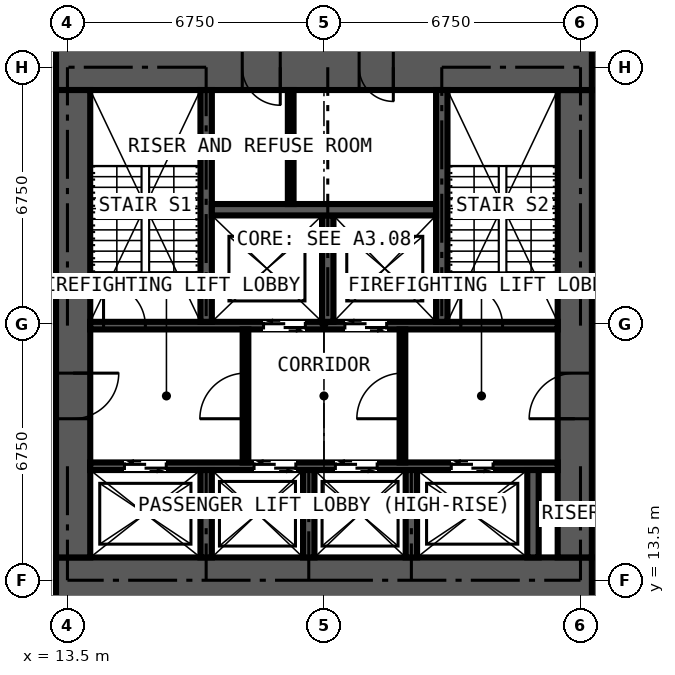
"""IFC4 building model, lengths in metres.
Left out: names, types, materials, properties, quantities, classifications, styles, units other than length and angle.
Written with IfcOpenShell. Run it as: python <this file> out.ifc"""

import sys

from ifc_helpers import new_model, si_unit, direction, frame, frame_2d, origin, place, context, subcontext, project, spatial, rectangle, extrude, element, fill, save


model = new_model("IFC4")
c1 = context("Model", 3, precision=1e-05, world=origin(), true_north=direction((0.0, 1.0)))
c2 = subcontext(c1, "Body", "Model", "MODEL_VIEW")
j1 = project(units=[si_unit("LENGTHUNIT", "METRE"), si_unit("PLANEANGLEUNIT", "RADIAN")], contexts=[c1])
p1 = place(None, origin())
s1 = spatial("IfcSite", under=j1, at=p1, CompositionType="ELEMENT")
p2 = place(p1, origin())
s2 = spatial("IfcBuilding", under=s1, at=p2, CompositionType="ELEMENT")
p3 = place(p2, frame((0.0, 0.0, 218.7)))
s3 = spatial("IfcBuildingStorey", under=s2, at=p3, CompositionType="ELEMENT", Elevation=218.7)
p4 = place(p3, frame((13.2, 13.5, 0.0), z_axis=(0.0, 0.0, 1.0), x_axis=(1.0, 0.0, 0.0)))
e1 = element("IfcWall", 1, at=p4, inside=s3, PredefinedType="SHEAR", context=c2, shape_type="SweptSolid", body=[
    extrude(rectangle(XDim=14.1, YDim=1.2, at=frame_2d((7.05, 0.0))), origin(), (0.0, 0.0, 1.0), 3.6),
])
p5 = place(p3, frame((26.85, 14.1, 0.0), z_axis=(0.0, 0.0, 1.0), x_axis=(0.0, 1.0, 0.0)))
e2 = element("IfcWall", 2, at=p5, inside=s3, PredefinedType="SHEAR", context=c2, shape_type="SweptSolid", body=[
    extrude(rectangle(XDim=12.3, YDim=0.9, at=frame_2d((6.15, 0.0))), origin(), (0.0, 0.0, 1.0), 3.6),
])
p6 = place(p5, frame((3.65, 0.0, 0.0)))
e3 = element("IfcOpeningElement", 3, at=p6, cuts=e2, PredefinedType="OPENING", context=c2, shape_type="SweptSolid", body=[
    extrude(rectangle(XDim=1.2, YDim=2.2, at=frame_2d((0.6, 1.1))), frame((0.0, 0.46, 0.0), z_axis=(0.0, -1.0, 0.0), x_axis=(1.0, 0.0, 0.0)), (0.0, 0.0, 1.0), 0.92),
])
p7 = place(p3, frame((27.3, 27.0, 0.0), z_axis=(0.0, 0.0, 1.0), x_axis=(-1.0, 0.0, 0.0)))
e4 = element("IfcWall", 4, at=p7, inside=s3, PredefinedType="SHEAR", context=c2, shape_type="SweptSolid", body=[
    extrude(rectangle(XDim=14.1, YDim=1.2, at=frame_2d((7.05, 0.0))), origin(), (0.0, 0.0, 1.0), 3.6),
])
p8 = place(p7, frame((5.225, 0.0, 0.0)))
e5 = element("IfcOpeningElement", 5, at=p8, cuts=e4, PredefinedType="OPENING", context=c2, shape_type="SweptSolid", body=[
    extrude(rectangle(XDim=0.9, YDim=2.2, at=frame_2d((0.45, 1.1))), frame((0.0, 0.61, 0.0), z_axis=(0.0, -1.0, 0.0), x_axis=(1.0, 0.0, 0.0)), (0.0, 0.0, 1.0), 1.22),
])
p9 = place(p7, frame((8.2, 0.0, 0.0)))
e6 = element("IfcOpeningElement", 6, at=p9, cuts=e4, PredefinedType="OPENING", context=c2, shape_type="SweptSolid", body=[
    extrude(rectangle(XDim=1.0, YDim=2.2, at=frame_2d((0.5, 1.1))), frame((0.0, 0.61, 0.0), z_axis=(0.0, -1.0, 0.0), x_axis=(1.0, 0.0, 0.0)), (0.0, 0.0, 1.0), 1.22),
])
p10 = place(p3, frame((13.65, 26.4, 0.0), z_axis=(0.0, 0.0, 1.0), x_axis=(0.0, -1.0, 0.0)))
e7 = element("IfcWall", 7, at=p10, inside=s3, PredefinedType="SHEAR", context=c2, shape_type="SweptSolid", body=[
    extrude(rectangle(XDim=12.3, YDim=0.9, at=frame_2d((6.15, 0.0))), origin(), (0.0, 0.0, 1.0), 3.6),
])
p11 = place(p10, frame((7.45, 0.0, 0.0)))
e8 = element("IfcOpeningElement", 8, at=p11, cuts=e7, PredefinedType="OPENING", context=c2, shape_type="SweptSolid", body=[
    extrude(rectangle(XDim=1.2, YDim=2.2, at=frame_2d((0.6, 1.1))), frame((0.0, 0.46, 0.0), z_axis=(0.0, -1.0, 0.0), x_axis=(1.0, 0.0, 0.0)), (0.0, 0.0, 1.0), 0.92),
])
p12 = place(p3, frame((14.1, 16.5, 0.0), z_axis=(0.0, 0.0, 1.0), x_axis=(1.0, 0.0, 0.0)))
e9 = element("IfcWall", 9, at=p12, inside=s3, PredefinedType="SHEAR", context=c2, shape_type="SweptSolid", body=[
    extrude(rectangle(XDim=12.3, YDim=0.2, at=frame_2d((6.15, 0.0))), origin(), (0.0, 0.0, 1.0), 3.6),
])
p13 = place(p12, frame((0.9, 0.0, 0.0)))
e10 = element("IfcOpeningElement", 10, at=p13, cuts=e9, PredefinedType="OPENING", context=c2, shape_type="SweptSolid", body=[
    extrude(rectangle(XDim=1.1, YDim=2.2, at=frame_2d((0.55, 1.1))), frame((0.0, 0.11, 0.0), z_axis=(0.0, -1.0, 0.0), x_axis=(1.0, 0.0, 0.0)), (0.0, 0.0, 1.0), 0.22),
])
p14 = place(p12, frame((4.31, 0.0, 0.0)))
e11 = element("IfcOpeningElement", 11, at=p14, cuts=e9, PredefinedType="OPENING", context=c2, shape_type="SweptSolid", body=[
    extrude(rectangle(XDim=1.1, YDim=2.2, at=frame_2d((0.55, 1.1))), frame((0.0, 0.11, 0.0), z_axis=(0.0, -1.0, 0.0), x_axis=(1.0, 0.0, 0.0)), (0.0, 0.0, 1.0), 0.22),
])
p15 = place(p12, frame((6.45, 0.0, 0.0)))
e12 = element("IfcOpeningElement", 12, at=p15, cuts=e9, PredefinedType="OPENING", context=c2, shape_type="SweptSolid", body=[
    extrude(rectangle(XDim=1.1, YDim=2.2, at=frame_2d((0.55, 1.1))), frame((0.0, 0.11, 0.0), z_axis=(0.0, -1.0, 0.0), x_axis=(1.0, 0.0, 0.0)), (0.0, 0.0, 1.0), 0.22),
])
p16 = place(p12, frame((9.5, 0.0, 0.0)))
e13 = element("IfcOpeningElement", 13, at=p16, cuts=e9, PredefinedType="OPENING", context=c2, shape_type="SweptSolid", body=[
    extrude(rectangle(XDim=1.1, YDim=2.2, at=frame_2d((0.55, 1.1))), frame((0.0, 0.11, 0.0), z_axis=(0.0, -1.0, 0.0), x_axis=(1.0, 0.0, 0.0)), (0.0, 0.0, 1.0), 0.22),
])
p17 = place(p3, frame((14.1, 20.2, 0.0), z_axis=(0.0, 0.0, 1.0), x_axis=(1.0, 0.0, 0.0)))
e14 = element("IfcWall", 14, at=p17, inside=s3, PredefinedType="SHEAR", context=c2, shape_type="SweptSolid", body=[
    extrude(rectangle(XDim=12.3, YDim=0.2, at=frame_2d((6.15, 0.0))), origin(), (0.0, 0.0, 1.0), 3.6),
])
p18 = place(p17, frame((4.56, 0.0, 0.0)))
e15 = element("IfcOpeningElement", 15, at=p18, cuts=e14, PredefinedType="OPENING", context=c2, shape_type="SweptSolid", body=[
    extrude(rectangle(XDim=1.1, YDim=2.2, at=frame_2d((0.55, 1.1))), frame((0.0, 0.11, 0.0), z_axis=(0.0, -1.0, 0.0), x_axis=(1.0, 0.0, 0.0)), (0.0, 0.0, 1.0), 0.22),
])
p19 = place(p17, frame((6.7, 0.0, 0.0)))
e16 = element("IfcOpeningElement", 16, at=p19, cuts=e14, PredefinedType="OPENING", context=c2, shape_type="SweptSolid", body=[
    extrude(rectangle(XDim=1.1, YDim=2.2, at=frame_2d((0.55, 1.1))), frame((0.0, 0.11, 0.0), z_axis=(0.0, -1.0, 0.0), x_axis=(1.0, 0.0, 0.0)), (0.0, 0.0, 1.0), 0.22),
])
p20 = place(p17, frame((0.35, 0.0, 0.0)))
e17 = element("IfcOpeningElement", 17, at=p20, cuts=e14, PredefinedType="OPENING", context=c2, shape_type="SweptSolid", body=[
    extrude(rectangle(XDim=1.1, YDim=2.2, at=frame_2d((0.55, 1.1))), frame((0.0, 0.11, 0.0), z_axis=(0.0, -1.0, 0.0), x_axis=(1.0, 0.0, 0.0)), (0.0, 0.0, 1.0), 0.22),
])
p21 = place(p17, frame((9.75, 0.0, 0.0)))
e18 = element("IfcOpeningElement", 18, at=p21, cuts=e14, PredefinedType="OPENING", context=c2, shape_type="SweptSolid", body=[
    extrude(rectangle(XDim=1.1, YDim=2.2, at=frame_2d((0.55, 1.1))), frame((0.0, 0.11, 0.0), z_axis=(0.0, -1.0, 0.0), x_axis=(1.0, 0.0, 0.0)), (0.0, 0.0, 1.0), 0.22),
])
for number, where, z_axis, x_axis in (
    (19, (17.15, 20.3, 0.0), (0.0, 0.0, 1.0), (0.0, 1.0, 0.0)),
    (20, (23.35, 20.3, 0.0), (0.0, 0.0, 1.0), (0.0, 1.0, 0.0)),
):
    element("IfcWall", number, at=place(p3, frame(where, z_axis=z_axis, x_axis=x_axis)), inside=s3, PredefinedType="SHEAR", context=c2, shape_type="SweptSolid", body=[
        extrude(rectangle(XDim=6.1, YDim=0.3, at=frame_2d((3.05, 0.0))), origin(), (0.0, 0.0, 1.0), 3.6),
    ])
p22 = place(p3, frame((20.35, 20.3, 0.0), z_axis=(0.0, 0.0, 1.0), x_axis=(0.0, 1.0, 0.0)))
e21 = element("IfcWall", 21, at=p22, inside=s3, PredefinedType="SHEAR", context=c2, shape_type="SweptSolid", body=[
    extrude(rectangle(XDim=2.8, YDim=0.3, at=frame_2d((1.4, 0.0))), origin(), (0.0, 0.0, 1.0), 3.6),
])
p23 = place(p3, frame((17.3, 23.25, 0.0), z_axis=(0.0, 0.0, 1.0), x_axis=(1.0, 0.0, 0.0)))
e22 = element("IfcWall", 22, at=p23, inside=s3, PredefinedType="SHEAR", context=c2, shape_type="SweptSolid", body=[
    extrude(rectangle(XDim=5.9, YDim=0.3, at=frame_2d((2.95, 0.0))), origin(), (0.0, 0.0, 1.0), 3.6),
])
for number, where, z_axis, x_axis in (
    (23, (17.15, 14.1, 0.0), (0.0, 0.0, 1.0), (0.0, 1.0, 0.0)),
    (24, (19.85, 14.1, 0.0), (0.0, 0.0, 1.0), (0.0, 1.0, 0.0)),
    (25, (22.55, 14.1, 0.0), (0.0, 0.0, 1.0), (0.0, 1.0, 0.0)),
    (26, (25.75, 14.1, 0.0), (0.0, 0.0, 1.0), (0.0, 1.0, 0.0)),
):
    element("IfcWall", number, at=place(p3, frame(where, z_axis=z_axis, x_axis=x_axis)), inside=s3, PredefinedType="SHEAR", context=c2, shape_type="SweptSolid", body=[
        extrude(rectangle(XDim=2.3, YDim=0.3, at=frame_2d((1.15, 0.0))), origin(), (0.0, 0.0, 1.0), 3.6),
    ])
p24 = place(p3, frame((18.185, 16.6, 0.0), z_axis=(0.0, 0.0, 1.0), x_axis=(0.0, 1.0, 0.0)))
e27 = element("IfcWall", 27, at=p24, inside=s3, PredefinedType="PARTITIONING", context=c2, shape_type="SweptSolid", body=[
    extrude(rectangle(XDim=3.5, YDim=0.15, at=frame_2d((1.75, 0.0))), origin(), (0.0, 0.0, 1.0), 3.375),
])
p25 = place(p24, frame((1.15, 0.0, 0.0)))
e28 = element("IfcOpeningElement", 28, at=p25, cuts=e27, PredefinedType="OPENING", context=c2, shape_type="SweptSolid", body=[
    extrude(rectangle(XDim=1.2, YDim=2.2, at=frame_2d((0.6, 1.1))), frame((0.0, 0.085, 0.0), z_axis=(0.0, -1.0, 0.0), x_axis=(1.0, 0.0, 0.0)), (0.0, 0.0, 1.0), 0.17),
])
p26 = place(p3, frame((22.315, 16.6, 0.0), z_axis=(0.0, 0.0, 1.0), x_axis=(0.0, 1.0, 0.0)))
e29 = element("IfcWall", 29, at=p26, inside=s3, PredefinedType="PARTITIONING", context=c2, shape_type="SweptSolid", body=[
    extrude(rectangle(XDim=3.5, YDim=0.15, at=frame_2d((1.75, 0.0))), origin(), (0.0, 0.0, 1.0), 3.375),
])
p27 = place(p26, frame((1.15, 0.0, 0.0)))
e30 = element("IfcOpeningElement", 30, at=p27, cuts=e29, PredefinedType="OPENING", context=c2, shape_type="SweptSolid", body=[
    extrude(rectangle(XDim=1.2, YDim=2.2, at=frame_2d((0.6, 1.1))), frame((0.0, 0.085, 0.0), z_axis=(0.0, -1.0, 0.0), x_axis=(1.0, 0.0, 0.0)), (0.0, 0.0, 1.0), 0.17),
])
p28 = place(p3, frame((19.375, 23.4, 0.0), z_axis=(0.0, 0.0, 1.0), x_axis=(0.0, 1.0, 0.0)))
e31 = element("IfcWall", 31, at=p28, inside=s3, PredefinedType="PARTITIONING", context=c2, shape_type="SweptSolid", body=[
    extrude(rectangle(XDim=3.0, YDim=0.15, at=frame_2d((1.5, 0.0))), origin(), (0.0, 0.0, 1.0), 3.375),
])
p29 = place(p13, origin())
e32 = element("IfcDoor", 32, at=p29, inside=s3, OperationType="DOUBLE_DOOR_SLIDING", PredefinedType="DOOR", context=c2, shape_type="SweptSolid", body=[
    extrude(rectangle(XDim=1.1, YDim=2.2, at=frame_2d((0.55, 1.1))), frame((0.0, 0.025, 0.0), z_axis=(0.0, -1.0, 0.0), x_axis=(1.0, 0.0, 0.0)), (0.0, 0.0, 1.0), 0.05),
])
fill(e10, e32)
p30 = place(p14, origin())
e33 = element("IfcDoor", 33, at=p30, inside=s3, OperationType="DOUBLE_DOOR_SLIDING", PredefinedType="DOOR", context=c2, shape_type="SweptSolid", body=[
    extrude(rectangle(XDim=1.1, YDim=2.2, at=frame_2d((0.55, 1.1))), frame((0.0, 0.025, 0.0), z_axis=(0.0, -1.0, 0.0), x_axis=(1.0, 0.0, 0.0)), (0.0, 0.0, 1.0), 0.05),
])
fill(e11, e33)
p31 = place(p15, origin())
e34 = element("IfcDoor", 34, at=p31, inside=s3, OperationType="DOUBLE_DOOR_SLIDING", PredefinedType="DOOR", context=c2, shape_type="SweptSolid", body=[
    extrude(rectangle(XDim=1.1, YDim=2.2, at=frame_2d((0.55, 1.1))), frame((0.0, 0.025, 0.0), z_axis=(0.0, -1.0, 0.0), x_axis=(1.0, 0.0, 0.0)), (0.0, 0.0, 1.0), 0.05),
])
fill(e12, e34)
p32 = place(p16, origin())
e35 = element("IfcDoor", 35, at=p32, inside=s3, OperationType="DOUBLE_DOOR_SLIDING", PredefinedType="DOOR", context=c2, shape_type="SweptSolid", body=[
    extrude(rectangle(XDim=1.1, YDim=2.2, at=frame_2d((0.55, 1.1))), frame((0.0, 0.025, 0.0), z_axis=(0.0, -1.0, 0.0), x_axis=(1.0, 0.0, 0.0)), (0.0, 0.0, 1.0), 0.05),
])
fill(e13, e35)
p33 = place(p18, origin())
e36 = element("IfcDoor", 36, at=p33, inside=s3, OperationType="DOUBLE_DOOR_SLIDING", PredefinedType="DOOR", context=c2, shape_type="SweptSolid", body=[
    extrude(rectangle(XDim=1.1, YDim=2.2, at=frame_2d((0.55, 1.1))), frame((0.0, 0.025, 0.0), z_axis=(0.0, -1.0, 0.0), x_axis=(1.0, 0.0, 0.0)), (0.0, 0.0, 1.0), 0.05),
])
fill(e15, e36)
p34 = place(p19, origin())
e37 = element("IfcDoor", 37, at=p34, inside=s3, OperationType="DOUBLE_DOOR_SLIDING", PredefinedType="DOOR", context=c2, shape_type="SweptSolid", body=[
    extrude(rectangle(XDim=1.1, YDim=2.2, at=frame_2d((0.55, 1.1))), frame((0.0, 0.025, 0.0), z_axis=(0.0, -1.0, 0.0), x_axis=(1.0, 0.0, 0.0)), (0.0, 0.0, 1.0), 0.05),
])
fill(e16, e37)
p35 = place(p11, origin())
e38 = element("IfcDoor", 38, at=p35, inside=s3, OperationType="DOUBLE_DOOR_SINGLE_SWING", PredefinedType="DOOR", context=c2, shape_type="SweptSolid", body=[
    extrude(rectangle(XDim=1.2, YDim=2.2, at=frame_2d((0.6, 1.1))), frame((0.0, 0.025, 0.0), z_axis=(0.0, -1.0, 0.0), x_axis=(1.0, 0.0, 0.0)), (0.0, 0.0, 1.0), 0.05),
])
fill(e8, e38)
p36 = place(p6, origin())
e39 = element("IfcDoor", 39, at=p36, inside=s3, OperationType="DOUBLE_DOOR_SINGLE_SWING", PredefinedType="DOOR", context=c2, shape_type="SweptSolid", body=[
    extrude(rectangle(XDim=1.2, YDim=2.2, at=frame_2d((0.6, 1.1))), frame((0.0, 0.025, 0.0), z_axis=(0.0, -1.0, 0.0), x_axis=(1.0, 0.0, 0.0)), (0.0, 0.0, 1.0), 0.05),
])
fill(e3, e39)
p37 = place(p25, origin())
e40 = element("IfcDoor", 40, at=p37, inside=s3, OperationType="DOUBLE_DOOR_SINGLE_SWING", PredefinedType="DOOR", context=c2, shape_type="SweptSolid", body=[
    extrude(rectangle(XDim=1.2, YDim=2.2, at=frame_2d((0.6, 1.1))), frame((0.0, 0.025, 0.0), z_axis=(0.0, -1.0, 0.0), x_axis=(1.0, 0.0, 0.0)), (0.0, 0.0, 1.0), 0.05),
])
fill(e28, e40)
p38 = place(p27, origin())
e41 = element("IfcDoor", 41, at=p38, inside=s3, OperationType="DOUBLE_DOOR_SINGLE_SWING", PredefinedType="DOOR", context=c2, shape_type="SweptSolid", body=[
    extrude(rectangle(XDim=1.2, YDim=2.2, at=frame_2d((0.6, 1.1))), frame((0.0, 0.025, 0.0), z_axis=(0.0, -1.0, 0.0), x_axis=(1.0, 0.0, 0.0)), (0.0, 0.0, 1.0), 0.05),
])
fill(e30, e41)
p39 = place(p8, origin())
e42 = element("IfcDoor", 42, at=p39, inside=s3, OperationType="SINGLE_SWING_LEFT", PredefinedType="DOOR", context=c2, shape_type="SweptSolid", body=[
    extrude(rectangle(XDim=0.9, YDim=2.2, at=frame_2d((0.45, 1.1))), frame((0.0, 0.4, 0.0), z_axis=(0.0, -1.0, 0.0), x_axis=(1.0, 0.0, 0.0)), (0.0, 0.0, 1.0), 0.8),
])
fill(e5, e42)
p40 = place(p9, origin())
e43 = element("IfcDoor", 43, at=p40, inside=s3, OperationType="SINGLE_SWING_LEFT", PredefinedType="DOOR", context=c2, shape_type="SweptSolid", body=[
    extrude(rectangle(XDim=1.0, YDim=2.2, at=frame_2d((0.5, 1.1))), frame((0.0, 0.025, 0.0), z_axis=(0.0, -1.0, 0.0), x_axis=(1.0, 0.0, 0.0)), (0.0, 0.0, 1.0), 0.05),
])
fill(e6, e43)
p41 = place(p20, origin())
e44 = element("IfcDoor", 44, at=p41, inside=s3, OperationType="SINGLE_SWING_LEFT", PredefinedType="DOOR", context=c2, shape_type="SweptSolid", body=[
    extrude(rectangle(XDim=1.1, YDim=2.2, at=frame_2d((0.55, 1.1))), frame((0.0, 0.025, 0.0), z_axis=(0.0, -1.0, 0.0), x_axis=(1.0, 0.0, 0.0)), (0.0, 0.0, 1.0), 0.05),
])
fill(e17, e44)
p42 = place(p21, origin())
e45 = element("IfcDoor", 45, at=p42, inside=s3, OperationType="SINGLE_SWING_LEFT", PredefinedType="DOOR", context=c2, shape_type="SweptSolid", body=[
    extrude(rectangle(XDim=1.1, YDim=2.2, at=frame_2d((0.55, 1.1))), frame((0.0, 0.025, 0.0), z_axis=(0.0, -1.0, 0.0), x_axis=(1.0, 0.0, 0.0)), (0.0, 0.0, 1.0), 0.05),
])
fill(e18, e45)
save(model, sys.argv[1])
